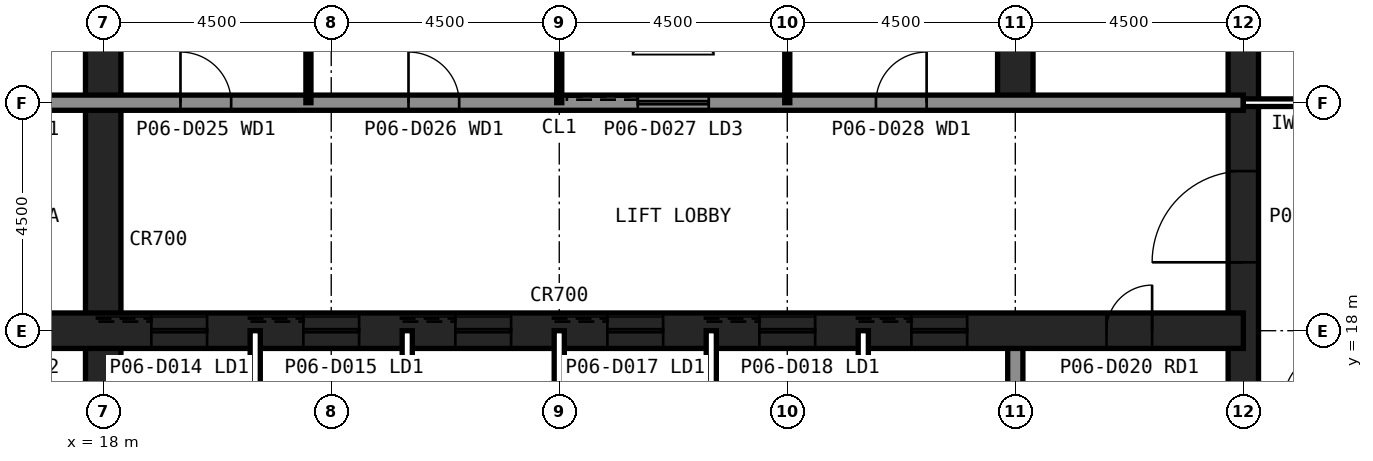
"""IFC4 building model, lengths in metres.
Left out: names, types, materials, properties, quantities, classifications, styles, units other than length and angle.
Written with IfcOpenShell. Run it as: python <this file> out.ifc"""

import sys

from ifc_helpers import new_model, si_unit, direction, frame, frame_2d, origin, place, context, subcontext, project, spatial, rectangle, extrude, element, fill, save


model = new_model("IFC4")
c1 = context("Model", 3, precision=1e-05, world=origin(), true_north=direction((0.0, 1.0)))
c2 = subcontext(c1, "Body", "Model", "MODEL_VIEW")
j1 = project(units=[si_unit("LENGTHUNIT", "METRE"), si_unit("PLANEANGLEUNIT", "RADIAN")], contexts=[c1])
p1 = place(None, origin())
s1 = spatial("IfcSite", under=j1, at=p1, CompositionType="ELEMENT")
p2 = place(p1, origin())
s2 = spatial("IfcBuilding", under=s1, at=p2, CompositionType="ELEMENT")
p3 = place(p2, frame((0.0, 0.0, 29.0)))
s3 = spatial("IfcBuildingStorey", under=s2, at=p3, CompositionType="ELEMENT", Elevation=29.0)
p4 = place(p3, frame((40.5, 13.5, 0.0), z_axis=(0.0, 0.0, 1.0), x_axis=(0.0, 1.0, 0.0)))
e1 = element("IfcWall", 1, at=p4, inside=s3, PredefinedType="SHEAR", context=c2, shape_type="SweptSolid", body=[
    extrude(rectangle(XDim=27.0, YDim=0.6, at=frame_2d((13.5, 0.0))), origin(), (0.0, 0.0, 1.0), 4.2),
])
p5 = place(p4, frame((5.85, 0.0, 0.0)))
e2 = element("IfcOpeningElement", 2, at=p5, cuts=e1, PredefinedType="OPENING", context=c2, shape_type="SweptSolid", body=[
    extrude(rectangle(XDim=1.8, YDim=2.1, at=frame_2d((0.9, 1.05))), frame((0.0, 0.31, 0.0), z_axis=(0.0, -1.0, 0.0), x_axis=(1.0, 0.0, 0.0)), (0.0, 0.0, 1.0), 0.62),
])
p6 = place(p4, frame((19.65, 0.0, 0.0)))
e3 = element("IfcOpeningElement", 3, at=p6, cuts=e1, PredefinedType="OPENING", context=c2, shape_type="SweptSolid", body=[
    extrude(rectangle(XDim=1.2, YDim=2.1, at=frame_2d((0.6, 1.05))), frame((0.0, 0.31, 0.0), z_axis=(0.0, -1.0, 0.0), x_axis=(1.0, 0.0, 0.0)), (0.0, 0.0, 1.0), 0.62),
])
p7 = place(p3, frame((18.0, 13.5, 0.0), z_axis=(0.0, 0.0, 1.0), x_axis=(0.0, 1.0, 0.0)))
e4 = element("IfcWall", 4, at=p7, inside=s3, PredefinedType="SHEAR", context=c2, shape_type="SweptSolid", body=[
    extrude(rectangle(XDim=18.0, YDim=0.7, at=frame_2d((9.0, 0.0))), origin(), (0.0, 0.0, 1.0), 4.2),
])
p8 = place(p3, frame((36.0, 13.5, 0.0), z_axis=(0.0, 0.0, 1.0), x_axis=(0.0, 1.0, 0.0)))
e5 = element("IfcWall", 5, at=p8, inside=s3, PredefinedType="SOLIDWALL", context=c2, shape_type="SweptSolid", body=[
    extrude(rectangle(XDim=4.5, YDim=0.3, at=frame_2d((2.25, 0.0))), origin(), (0.0, 0.0, 1.0), 4.04),
])
p9 = place(p3, frame((36.0, 22.5, 0.0), z_axis=(0.0, 0.0, 1.0), x_axis=(0.0, 1.0, 0.0)))
e6 = element("IfcWall", 6, at=p9, inside=s3, PredefinedType="SHEAR", context=c2, shape_type="SweptSolid", body=[
    extrude(rectangle(XDim=18.0, YDim=0.7, at=frame_2d((9.0, 0.0))), origin(), (0.0, 0.0, 1.0), 4.2),
])
p10 = place(p3, frame((13.5, 18.0, 0.0), z_axis=(0.0, 0.0, 1.0), x_axis=(1.0, 0.0, 0.0)))
e7 = element("IfcWall", 7, at=p10, inside=s3, PredefinedType="SHEAR", context=c2, shape_type="SweptSolid", body=[
    extrude(rectangle(XDim=27.0, YDim=0.7, at=frame_2d((13.5, 0.0))), origin(), (0.0, 0.0, 1.0), 4.2),
])
p11 = place(p10, frame((24.3, 0.0, 0.0)))
e8 = element("IfcOpeningElement", 8, at=p11, cuts=e7, PredefinedType="OPENING", context=c2, shape_type="SweptSolid", body=[
    extrude(rectangle(XDim=0.9, YDim=2.1, at=frame_2d((0.45, 1.05))), frame((0.0, 0.36, 0.0), z_axis=(0.0, -1.0, 0.0), x_axis=(1.0, 0.0, 0.0)), (0.0, 0.0, 1.0), 0.72),
])
p12 = place(p10, frame((5.45, 0.0, 0.0)))
e9 = element("IfcOpeningElement", 9, at=p12, cuts=e7, PredefinedType="OPENING", context=c2, shape_type="SweptSolid", body=[
    extrude(rectangle(XDim=1.1, YDim=2.1, at=frame_2d((0.55, 1.05))), frame((0.0, 0.36, 0.0), z_axis=(0.0, -1.0, 0.0), x_axis=(1.0, 0.0, 0.0)), (0.0, 0.0, 1.0), 0.72),
])
p13 = place(p10, frame((8.45, 0.0, 0.0)))
e10 = element("IfcOpeningElement", 10, at=p13, cuts=e7, PredefinedType="OPENING", context=c2, shape_type="SweptSolid", body=[
    extrude(rectangle(XDim=1.1, YDim=2.1, at=frame_2d((0.55, 1.05))), frame((0.0, 0.36, 0.0), z_axis=(0.0, -1.0, 0.0), x_axis=(1.0, 0.0, 0.0)), (0.0, 0.0, 1.0), 0.72),
])
p14 = place(p10, frame((11.45, 0.0, 0.0)))
e11 = element("IfcOpeningElement", 11, at=p14, cuts=e7, PredefinedType="OPENING", context=c2, shape_type="SweptSolid", body=[
    extrude(rectangle(XDim=1.1, YDim=2.1, at=frame_2d((0.55, 1.05))), frame((0.0, 0.36, 0.0), z_axis=(0.0, -1.0, 0.0), x_axis=(1.0, 0.0, 0.0)), (0.0, 0.0, 1.0), 0.72),
])
p15 = place(p10, frame((14.45, 0.0, 0.0)))
e12 = element("IfcOpeningElement", 12, at=p15, cuts=e7, PredefinedType="OPENING", context=c2, shape_type="SweptSolid", body=[
    extrude(rectangle(XDim=1.1, YDim=2.1, at=frame_2d((0.55, 1.05))), frame((0.0, 0.36, 0.0), z_axis=(0.0, -1.0, 0.0), x_axis=(1.0, 0.0, 0.0)), (0.0, 0.0, 1.0), 0.72),
])
p16 = place(p10, frame((17.45, 0.0, 0.0)))
e13 = element("IfcOpeningElement", 13, at=p16, cuts=e7, PredefinedType="OPENING", context=c2, shape_type="SweptSolid", body=[
    extrude(rectangle(XDim=1.1, YDim=2.1, at=frame_2d((0.55, 1.05))), frame((0.0, 0.36, 0.0), z_axis=(0.0, -1.0, 0.0), x_axis=(1.0, 0.0, 0.0)), (0.0, 0.0, 1.0), 0.72),
])
p17 = place(p10, frame((20.45, 0.0, 0.0)))
e14 = element("IfcOpeningElement", 14, at=p17, cuts=e7, PredefinedType="OPENING", context=c2, shape_type="SweptSolid", body=[
    extrude(rectangle(XDim=1.1, YDim=2.1, at=frame_2d((0.55, 1.05))), frame((0.0, 0.36, 0.0), z_axis=(0.0, -1.0, 0.0), x_axis=(1.0, 0.0, 0.0)), (0.0, 0.0, 1.0), 0.72),
])
p18 = place(p10, frame((1.6, 0.0, 0.0)))
e15 = element("IfcOpeningElement", 15, at=p18, cuts=e7, PredefinedType="OPENING", context=c2, shape_type="SweptSolid", body=[
    extrude(rectangle(XDim=1.3, YDim=2.2, at=frame_2d((0.65, 1.1))), frame((0.0, 0.36, 0.0), z_axis=(0.0, -1.0, 0.0), x_axis=(1.0, 0.0, 0.0)), (0.0, 0.0, 1.0), 0.72),
])
p19 = place(p3, frame((13.5, 22.5, 0.0), z_axis=(0.0, 0.0, 1.0), x_axis=(1.0, 0.0, 0.0)))
e16 = element("IfcWall", 16, at=p19, inside=s3, PredefinedType="SOLIDWALL", context=c2, shape_type="SweptSolid", body=[
    extrude(rectangle(XDim=27.0, YDim=0.3, at=frame_2d((13.5, 0.0))), origin(), (0.0, 0.0, 1.0), 4.04),
])
p20 = place(p19, frame((1.65, 0.0, 0.0)))
e17 = element("IfcOpeningElement", 17, at=p20, cuts=e16, PredefinedType="OPENING", context=c2, shape_type="SweptSolid", body=[
    extrude(rectangle(XDim=1.2, YDim=2.1, at=frame_2d((0.6, 1.05))), frame((0.0, 0.16, 0.0), z_axis=(0.0, -1.0, 0.0), x_axis=(1.0, 0.0, 0.0)), (0.0, 0.0, 1.0), 0.32),
])
p21 = place(p19, frame((6.025, 0.0, 0.0)))
e18 = element("IfcOpeningElement", 18, at=p21, cuts=e16, PredefinedType="OPENING", context=c2, shape_type="SweptSolid", body=[
    extrude(rectangle(XDim=1.0, YDim=2.1, at=frame_2d((0.5, 1.05))), frame((0.0, 0.16, 0.0), z_axis=(0.0, -1.0, 0.0), x_axis=(1.0, 0.0, 0.0)), (0.0, 0.0, 1.0), 0.32),
])
p22 = place(p19, frame((10.525, 0.0, 0.0)))
e19 = element("IfcOpeningElement", 19, at=p22, cuts=e16, PredefinedType="OPENING", context=c2, shape_type="SweptSolid", body=[
    extrude(rectangle(XDim=1.0, YDim=2.1, at=frame_2d((0.5, 1.05))), frame((0.0, 0.16, 0.0), z_axis=(0.0, -1.0, 0.0), x_axis=(1.0, 0.0, 0.0)), (0.0, 0.0, 1.0), 0.32),
])
p23 = place(p19, frame((19.75, 0.0, 0.0)))
e20 = element("IfcOpeningElement", 20, at=p23, cuts=e16, PredefinedType="OPENING", context=c2, shape_type="SweptSolid", body=[
    extrude(rectangle(XDim=1.0, YDim=2.1, at=frame_2d((0.5, 1.05))), frame((0.0, 0.16, 0.0), z_axis=(0.0, -1.0, 0.0), x_axis=(1.0, 0.0, 0.0)), (0.0, 0.0, 1.0), 0.32),
])
p24 = place(p19, frame((15.05, 0.0, 0.0)))
e21 = element("IfcOpeningElement", 21, at=p24, cuts=e16, PredefinedType="OPENING", context=c2, shape_type="SweptSolid", body=[
    extrude(rectangle(XDim=1.4, YDim=2.4, at=frame_2d((0.7, 1.2))), frame((0.0, 0.16, 0.0), z_axis=(0.0, -1.0, 0.0), x_axis=(1.0, 0.0, 0.0)), (0.0, 0.0, 1.0), 0.32),
])
for number, where, z_axis, x_axis in (
    (22, (21.0, 13.5, 0.0), (0.0, 0.0, 1.0), (0.0, 1.0, 0.0)),
    (23, (24.0, 13.5, 0.0), (0.0, 0.0, 1.0), (0.0, 1.0, 0.0)),
    (24, (27.0, 13.5, 0.0), (0.0, 0.0, 1.0), (0.0, 1.0, 0.0)),
    (25, (30.0, 13.5, 0.0), (0.0, 0.0, 1.0), (0.0, 1.0, 0.0)),
    (26, (33.0, 13.5, 0.0), (0.0, 0.0, 1.0), (0.0, 1.0, 0.0)),
):
    element("IfcWall", number, at=place(p3, frame(where, z_axis=z_axis, x_axis=x_axis)), inside=s3, PredefinedType="PARTITIONING", context=c2, shape_type="SweptSolid", body=[
        extrude(rectangle(XDim=4.5, YDim=0.2, at=frame_2d((2.25, 0.0))), origin(), (0.0, 0.0, 1.0), 4.04),
    ])
for number, where, z_axis, x_axis in (
    (27, (22.05, 22.5, 0.0), (0.0, 0.0, 1.0), (0.0, 1.0, 0.0)),
    (28, (27.0, 22.5, 0.0), (0.0, 0.0, 1.0), (0.0, 1.0, 0.0)),
    (29, (31.5, 22.5, 0.0), (0.0, 0.0, 1.0), (0.0, 1.0, 0.0)),
):
    element("IfcWall", number, at=place(p3, frame(where, z_axis=z_axis, x_axis=x_axis)), inside=s3, PredefinedType="PLUMBINGWALL", context=c2, shape_type="SweptSolid", body=[
        extrude(rectangle(XDim=9.0, YDim=0.1, at=frame_2d((4.5, 0.0))), origin(), (0.0, 0.0, 1.0), 4.04),
    ])
p25 = place(p3, frame((42.3, 22.5, 0.0), z_axis=(0.0, 0.0, 1.0), x_axis=(-1.0, 0.0, 0.0)))
e30 = element("IfcWall", 30, at=p25, inside=s3, PredefinedType="PARTITIONING", context=c2, shape_type="SweptSolid", body=[
    extrude(rectangle(XDim=1.8, YDim=0.15, at=frame_2d((0.9, 0.0))), origin(), (0.0, 0.0, 1.0), 3.189),
])
p26 = place(p5, origin())
e31 = element("IfcDoor", 31, at=p26, inside=s3, OperationType="SINGLE_SWING_LEFT", PredefinedType="DOOR", context=c2, shape_type="SweptSolid", body=[
    extrude(rectangle(XDim=1.8, YDim=2.1, at=frame_2d((0.9, 1.05))), frame((0.0, 0.025, 0.0), z_axis=(0.0, -1.0, 0.0), x_axis=(1.0, 0.0, 0.0)), (0.0, 0.0, 1.0), 0.05),
])
fill(e2, e31)
p27 = place(p21, origin())
e32 = element("IfcDoor", 32, at=p27, inside=s3, OperationType="SINGLE_SWING_LEFT", PredefinedType="DOOR", context=c2, shape_type="SweptSolid", body=[
    extrude(rectangle(XDim=1.0, YDim=2.1, at=frame_2d((0.5, 1.05))), frame((0.0, 0.025, 0.0), z_axis=(0.0, -1.0, 0.0), x_axis=(1.0, 0.0, 0.0)), (0.0, 0.0, 1.0), 0.05),
])
fill(e18, e32)
p28 = place(p22, origin())
e33 = element("IfcDoor", 33, at=p28, inside=s3, OperationType="SINGLE_SWING_LEFT", PredefinedType="DOOR", context=c2, shape_type="SweptSolid", body=[
    extrude(rectangle(XDim=1.0, YDim=2.1, at=frame_2d((0.5, 1.05))), frame((0.0, 0.025, 0.0), z_axis=(0.0, -1.0, 0.0), x_axis=(1.0, 0.0, 0.0)), (0.0, 0.0, 1.0), 0.05),
])
fill(e19, e33)
p29 = place(p23, origin())
e34 = element("IfcDoor", 34, at=p29, inside=s3, OperationType="SINGLE_SWING_RIGHT", PredefinedType="DOOR", context=c2, shape_type="SweptSolid", body=[
    extrude(rectangle(XDim=1.0, YDim=2.1, at=frame_2d((0.5, 1.05))), frame((0.0, 0.025, 0.0), z_axis=(0.0, -1.0, 0.0), x_axis=(1.0, 0.0, 0.0)), (0.0, 0.0, 1.0), 0.05),
])
fill(e20, e34)
p30 = place(p11, origin())
e35 = element("IfcDoor", 35, at=p30, inside=s3, OperationType="SINGLE_SWING_RIGHT", PredefinedType="DOOR", context=c2, shape_type="SweptSolid", body=[
    extrude(rectangle(XDim=0.9, YDim=2.1, at=frame_2d((0.45, 1.05))), frame((0.0, 0.025, 0.0), z_axis=(0.0, -1.0, 0.0), x_axis=(1.0, 0.0, 0.0)), (0.0, 0.0, 1.0), 0.05),
])
fill(e8, e35)
p31 = place(p12, origin())
e36 = element("IfcDoor", 36, at=p31, inside=s3, OperationType="SLIDING_TO_LEFT", PredefinedType="DOOR", context=c2, shape_type="SweptSolid", body=[
    extrude(rectangle(XDim=1.1, YDim=2.1, at=frame_2d((0.55, 1.05))), frame((0.0, 0.025, 0.0), z_axis=(0.0, -1.0, 0.0), x_axis=(1.0, 0.0, 0.0)), (0.0, 0.0, 1.0), 0.05),
])
fill(e9, e36)
p32 = place(p13, origin())
e37 = element("IfcDoor", 37, at=p32, inside=s3, OperationType="SLIDING_TO_LEFT", PredefinedType="DOOR", context=c2, shape_type="SweptSolid", body=[
    extrude(rectangle(XDim=1.1, YDim=2.1, at=frame_2d((0.55, 1.05))), frame((0.0, 0.025, 0.0), z_axis=(0.0, -1.0, 0.0), x_axis=(1.0, 0.0, 0.0)), (0.0, 0.0, 1.0), 0.05),
])
fill(e10, e37)
p33 = place(p14, origin())
e38 = element("IfcDoor", 38, at=p33, inside=s3, OperationType="SLIDING_TO_LEFT", PredefinedType="DOOR", context=c2, shape_type="SweptSolid", body=[
    extrude(rectangle(XDim=1.1, YDim=2.1, at=frame_2d((0.55, 1.05))), frame((0.0, 0.025, 0.0), z_axis=(0.0, -1.0, 0.0), x_axis=(1.0, 0.0, 0.0)), (0.0, 0.0, 1.0), 0.05),
])
fill(e11, e38)
p34 = place(p15, origin())
e39 = element("IfcDoor", 39, at=p34, inside=s3, OperationType="SLIDING_TO_LEFT", PredefinedType="DOOR", context=c2, shape_type="SweptSolid", body=[
    extrude(rectangle(XDim=1.1, YDim=2.1, at=frame_2d((0.55, 1.05))), frame((0.0, 0.025, 0.0), z_axis=(0.0, -1.0, 0.0), x_axis=(1.0, 0.0, 0.0)), (0.0, 0.0, 1.0), 0.05),
])
fill(e12, e39)
p35 = place(p16, origin())
e40 = element("IfcDoor", 40, at=p35, inside=s3, OperationType="SLIDING_TO_LEFT", PredefinedType="DOOR", context=c2, shape_type="SweptSolid", body=[
    extrude(rectangle(XDim=1.1, YDim=2.1, at=frame_2d((0.55, 1.05))), frame((0.0, 0.025, 0.0), z_axis=(0.0, -1.0, 0.0), x_axis=(1.0, 0.0, 0.0)), (0.0, 0.0, 1.0), 0.05),
])
fill(e13, e40)
p36 = place(p17, origin())
e41 = element("IfcDoor", 41, at=p36, inside=s3, OperationType="SLIDING_TO_LEFT", PredefinedType="DOOR", context=c2, shape_type="SweptSolid", body=[
    extrude(rectangle(XDim=1.1, YDim=2.1, at=frame_2d((0.55, 1.05))), frame((0.0, 0.025, 0.0), z_axis=(0.0, -1.0, 0.0), x_axis=(1.0, 0.0, 0.0)), (0.0, 0.0, 1.0), 0.05),
])
fill(e14, e41)
p37 = place(p24, origin())
e42 = element("IfcDoor", 42, at=p37, inside=s3, OperationType="SLIDING_TO_LEFT", PredefinedType="DOOR", context=c2, shape_type="SweptSolid", body=[
    extrude(rectangle(XDim=1.4, YDim=2.4, at=frame_2d((0.7, 1.2))), frame((0.0, 0.025, 0.0), z_axis=(0.0, -1.0, 0.0), x_axis=(1.0, 0.0, 0.0)), (0.0, 0.0, 1.0), 0.05),
])
fill(e21, e42)
save(model, sys.argv[1])
